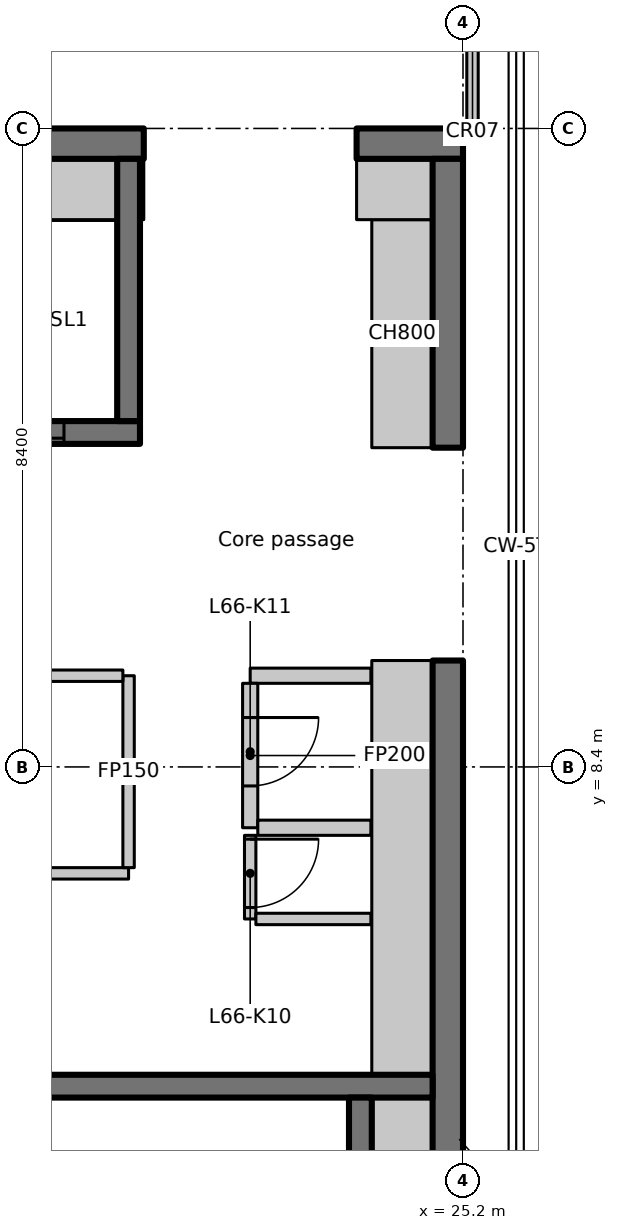
"""IFC4 building model, lengths in metres.
Left out: names, types, materials, properties, quantities, classifications, styles, units other than length and angle.
Written with IfcOpenShell. Run it as: python <this file> out.ifc"""

import sys

from ifc_helpers import new_model, si_unit, direction, frame, frame_2d, origin, place, context, subcontext, project, spatial, rectangle, extrude, element, fill, save


model = new_model("IFC4")
c1 = context("Model", 3, precision=1e-05, world=origin(), true_north=direction((0.0, 1.0)))
c2 = subcontext(c1, "Body", "Model", "MODEL_VIEW")
j1 = project(units=[si_unit("LENGTHUNIT", "METRE"), si_unit("PLANEANGLEUNIT", "RADIAN")], contexts=[c1])
p1 = place(None, origin())
s1 = spatial("IfcSite", under=j1, at=p1, CompositionType="ELEMENT")
p2 = place(p1, origin())
s2 = spatial("IfcBuilding", under=s1, at=p2, CompositionType="ELEMENT")
p3 = place(p2, frame((0.0, 0.0, 264.2)))
s3 = spatial("IfcBuildingStorey", under=s2, at=p3, CompositionType="ELEMENT", Elevation=264.2)
p4 = place(p3, frame((0.198, 16.6, 0.0), z_axis=(0.0, 0.0, 1.0), x_axis=(1.0, 0.0, 0.0)))
e1 = element("IfcWall", 1, at=p4, inside=s3, PredefinedType="SHEAR", context=c2, shape_type="SweptSolid", body=[
    extrude(rectangle(XDim=20.802, YDim=0.4, at=frame_2d((10.401, 0.0))), origin(), (0.0, 0.0, 1.0), 4.7),
])
p5 = place(p4, frame((1.852, 0.0, 0.0)))
e2 = element("IfcOpeningElement", 2, at=p5, cuts=e1, PredefinedType="OPENING", context=c2, shape_type="SweptSolid", body=[
    extrude(rectangle(XDim=1.1, YDim=2.3, at=frame_2d((0.55, 1.15))), frame((0.0, 0.21, 0.0), z_axis=(0.0, -1.0, 0.0), x_axis=(1.0, 0.0, 0.0)), (0.0, 0.0, 1.0), 0.42),
])
p6 = place(p3, frame((23.8, 16.6, 0.0), z_axis=(0.0, 0.0, 1.0), x_axis=(1.0, 0.0, 0.0)))
e3 = element("IfcWall", 3, at=p6, inside=s3, PredefinedType="SHEAR", context=c2, shape_type="SweptSolid", body=[
    extrude(rectangle(XDim=1.4, YDim=0.4, at=frame_2d((0.7, 0.0))), origin(), (0.0, 0.0, 1.0), 4.7),
])
p7 = place(p3, frame((25.0, 0.4, 0.0), z_axis=(0.0, 0.0, 1.0), x_axis=(0.0, 1.0, 0.0)))
e4 = element("IfcWall", 4, at=p7, inside=s3, PredefinedType="SHEAR", context=c2, shape_type="SweptSolid", body=[
    extrude(rectangle(XDim=9.4, YDim=0.4, at=frame_2d((4.7, 0.0))), origin(), (0.0, 0.0, 1.0), 4.7),
])
p8 = place(p3, frame((25.0, 12.6, 0.0), z_axis=(0.0, 0.0, 1.0), x_axis=(0.0, 1.0, 0.0)))
e5 = element("IfcWall", 5, at=p8, inside=s3, PredefinedType="SHEAR", context=c2, shape_type="SweptSolid", body=[
    extrude(rectangle(XDim=3.8, YDim=0.4, at=frame_2d((1.9, 0.0))), origin(), (0.0, 0.0, 1.0), 4.7),
])
p9 = place(p3, frame((24.4, 12.6, 0.0), z_axis=(0.0, 0.0, 1.0), x_axis=(0.0, 1.0, 0.0)))
e6 = element("IfcWall", 6, at=p9, inside=s3, PredefinedType="PARTITIONING", context=c2, shape_type="SweptSolid", body=[
    extrude(rectangle(XDim=3.0, YDim=0.8, at=frame_2d((1.5, 0.0))), origin(), (0.0, 0.0, 1.0), 4.7),
])
p10 = place(p3, frame((23.8, 16.0, 0.0), z_axis=(0.0, 0.0, 1.0), x_axis=(1.0, 0.0, 0.0)))
e7 = element("IfcWall", 7, at=p10, inside=s3, PredefinedType="PARTITIONING", context=c2, shape_type="SweptSolid", body=[
    extrude(rectangle(XDim=1.0, YDim=0.8, at=frame_2d((0.5, 0.0))), origin(), (0.0, 0.0, 1.0), 4.7),
])
p11 = place(p3, frame((17.85, 12.8, 0.0), z_axis=(0.0, 0.0, 1.0), x_axis=(1.0, 0.0, 0.0)))
e8 = element("IfcWall", 8, at=p11, inside=s3, PredefinedType="SHEAR", context=c2, shape_type="SweptSolid", body=[
    extrude(rectangle(XDim=3.1, YDim=0.3, at=frame_2d((1.55, 0.0))), origin(), (0.0, 0.0, 1.0), 4.7),
])
p12 = place(p11, frame((1.0, 0.0, 0.0)))
e9 = element("IfcOpeningElement", 9, at=p12, cuts=e8, PredefinedType="OPENING", context=c2, shape_type="SweptSolid", body=[
    extrude(rectangle(XDim=1.1, YDim=2.3, at=frame_2d((0.55, 1.15))), frame((0.0, 0.16, 0.0), z_axis=(0.0, -1.0, 0.0), x_axis=(1.0, 0.0, 0.0)), (0.0, 0.0, 1.0), 0.32),
])
p13 = place(p3, frame((20.8, 12.95, 0.0), z_axis=(0.0, 0.0, 1.0), x_axis=(0.0, 1.0, 0.0)))
e10 = element("IfcWall", 10, at=p13, inside=s3, PredefinedType="SHEAR", context=c2, shape_type="SweptSolid", body=[
    extrude(rectangle(XDim=3.45, YDim=0.3, at=frame_2d((1.725, 0.0))), origin(), (0.0, 0.0, 1.0), 4.7),
])
p14 = place(p3, frame((15.8, 4.2, 0.0), z_axis=(0.0, 0.0, 1.0), x_axis=(1.0, 0.0, 0.0)))
e11 = element("IfcWall", 11, at=p14, inside=s3, PredefinedType="SHEAR", context=c2, shape_type="SweptSolid", body=[
    extrude(rectangle(XDim=9.0, YDim=0.3, at=frame_2d((4.5, 0.0))), origin(), (0.0, 0.0, 1.0), 4.7),
])
p15 = place(p14, frame((0.4, 0.0, 0.0)))
e12 = element("IfcOpeningElement", 12, at=p15, cuts=e11, PredefinedType="OPENING", context=c2, shape_type="SweptSolid", body=[
    extrude(rectangle(XDim=1.0, YDim=2.1, at=frame_2d((0.5, 1.05))), frame((0.0, 0.16, 0.0), z_axis=(0.0, -1.0, 0.0), x_axis=(1.0, 0.0, 0.0)), (0.0, 0.0, 1.0), 0.32),
])
p16 = place(p3, frame((23.85, 1.5, 0.0), z_axis=(0.0, 0.0, 1.0), x_axis=(0.0, 1.0, 0.0)))
e13 = element("IfcWall", 13, at=p16, inside=s3, PredefinedType="SHEAR", context=c2, shape_type="SweptSolid", body=[
    extrude(rectangle(XDim=2.55, YDim=0.3, at=frame_2d((1.275, 0.0))), origin(), (0.0, 0.0, 1.0), 4.7),
])
p17 = place(p3, frame((23.988, 9.6, 0.0), z_axis=(0.0, 0.0, 1.0), x_axis=(-1.0, 0.0, 0.0)))
e14 = element("IfcWall", 14, at=p17, inside=s3, PredefinedType="PARTITIONING", context=c2, shape_type="SweptSolid", body=[
    extrude(rectangle(XDim=1.588, YDim=0.2, at=frame_2d((0.794, 0.0))), origin(), (0.0, 0.0, 1.0), 4.7),
])
p18 = place(p3, frame((22.4, 9.5, 0.0), z_axis=(0.0, 0.0, 1.0), x_axis=(0.0, -1.0, 0.0)))
e15 = element("IfcWall", 15, at=p18, inside=s3, PredefinedType="PARTITIONING", context=c2, shape_type="SweptSolid", body=[
    extrude(rectangle(XDim=1.9, YDim=0.2, at=frame_2d((0.95, 0.0))), origin(), (0.0, 0.0, 1.0), 4.7),
])
p19 = place(p18, frame((0.45, 0.0, 0.0)))
e16 = element("IfcOpeningElement", 16, at=p19, cuts=e15, PredefinedType="OPENING", context=c2, shape_type="SweptSolid", body=[
    extrude(rectangle(XDim=0.9, YDim=2.1, at=frame_2d((0.45, 1.05))), frame((0.0, 0.11, 0.0), z_axis=(0.0, -1.0, 0.0), x_axis=(1.0, 0.0, 0.0)), (0.0, 0.0, 1.0), 0.22),
])
p20 = place(p3, frame((22.5, 7.6, 0.0), z_axis=(0.0, 0.0, 1.0), x_axis=(1.0, 0.0, 0.0)))
e17 = element("IfcWall", 17, at=p20, inside=s3, PredefinedType="PARTITIONING", context=c2, shape_type="SweptSolid", body=[
    extrude(rectangle(XDim=1.488, YDim=0.2, at=frame_2d((0.744, 0.0))), origin(), (0.0, 0.0, 1.0), 4.7),
])
p21 = place(p3, frame((12.5, 7.0, 0.0), z_axis=(0.0, 0.0, 1.0), x_axis=(1.0, 0.0, 0.0)))
e18 = element("IfcWall", 18, at=p21, inside=s3, PredefinedType="PARTITIONING", context=c2, shape_type="SweptSolid", body=[
    extrude(rectangle(XDim=8.3, YDim=0.15, at=frame_2d((4.15, 0.0))), origin(), (0.0, 0.0, 1.0), 4.7),
])
p22 = place(p3, frame((20.8, 7.075, 0.0), z_axis=(0.0, 0.0, 1.0), x_axis=(0.0, 1.0, 0.0)))
e19 = element("IfcWall", 19, at=p22, inside=s3, PredefinedType="PARTITIONING", context=c2, shape_type="SweptSolid", body=[
    extrude(rectangle(XDim=2.525, YDim=0.15, at=frame_2d((1.263, 0.0))), origin(), (0.0, 0.0, 1.0), 4.7),
])
p23 = place(p3, frame((20.725, 9.6, 0.0), z_axis=(0.0, 0.0, 1.0), x_axis=(-1.0, 0.0, 0.0)))
e20 = element("IfcWall", 20, at=p23, inside=s3, PredefinedType="PARTITIONING", context=c2, shape_type="SweptSolid", body=[
    extrude(rectangle(XDim=8.225, YDim=0.15, at=frame_2d((4.113, 0.0))), origin(), (0.0, 0.0, 1.0), 4.7),
])
p24 = place(p23, frame((3.675, 0.0, 0.0)))
e21 = element("IfcOpeningElement", 21, at=p24, cuts=e20, PredefinedType="OPENING", context=c2, shape_type="SweptSolid", body=[
    extrude(rectangle(XDim=0.9, YDim=2.1, at=frame_2d((0.45, 1.05))), frame((0.0, 0.085, 0.0), z_axis=(0.0, -1.0, 0.0), x_axis=(1.0, 0.0, 0.0)), (0.0, 0.0, 1.0), 0.17),
])
p25 = place(p3, frame((22.4, 7.5, 0.0), z_axis=(0.0, 0.0, 1.0), x_axis=(0.0, -1.0, 0.0)))
e22 = element("IfcWall", 22, at=p25, inside=s3, PredefinedType="PARTITIONING", context=c2, shape_type="SweptSolid", body=[
    extrude(rectangle(XDim=1.1, YDim=0.15, at=frame_2d((0.55, 0.0))), origin(), (0.0, 0.0, 1.0), 4.7),
])
p26 = place(p25, frame((0.05, 0.0, 0.0)))
e23 = element("IfcOpeningElement", 23, at=p26, cuts=e22, PredefinedType="OPENING", context=c2, shape_type="SweptSolid", body=[
    extrude(rectangle(XDim=0.9, YDim=2.1, at=frame_2d((0.45, 1.05))), frame((0.0, 0.085, 0.0), z_axis=(0.0, -1.0, 0.0), x_axis=(1.0, 0.0, 0.0)), (0.0, 0.0, 1.0), 0.17),
])
p27 = place(p3, frame((22.475, 6.4, 0.0), z_axis=(0.0, 0.0, 1.0), x_axis=(1.0, 0.0, 0.0)))
e24 = element("IfcWall", 24, at=p27, inside=s3, PredefinedType="PARTITIONING", context=c2, shape_type="SweptSolid", body=[
    extrude(rectangle(XDim=1.513, YDim=0.15, at=frame_2d((0.756, 0.0))), origin(), (0.0, 0.0, 1.0), 4.7),
])
p28 = place(p3, frame((18.15, 16.0, 0.0), z_axis=(0.0, 0.0, 1.0), x_axis=(1.0, 0.0, 0.0)))
e25 = element("IfcWall", 25, at=p28, inside=s3, PredefinedType="PARTITIONING", context=c2, shape_type="SweptSolid", body=[
    extrude(rectangle(XDim=2.5, YDim=0.8, at=frame_2d((1.25, 0.0))), origin(), (0.0, 0.0, 1.0), 4.7),
])
p29 = place(p3, frame((20.95, 16.0, 0.0), z_axis=(0.0, 0.0, 1.0), x_axis=(1.0, 0.0, 0.0)))
e26 = element("IfcWall", 26, at=p29, inside=s3, PredefinedType="PARTITIONING", context=c2, shape_type="SweptSolid", body=[
    extrude(rectangle(XDim=0.05, YDim=0.8, at=frame_2d((0.025, 0.0))), origin(), (0.0, 0.0, 1.0), 4.7),
])
p30 = place(p3, frame((24.4, 1.5, 0.0), z_axis=(0.0, 0.0, 1.0), x_axis=(0.0, 1.0, 0.0)))
e27 = element("IfcWall", 27, at=p30, inside=s3, PredefinedType="PARTITIONING", context=c2, shape_type="SweptSolid", body=[
    extrude(rectangle(XDim=2.55, YDim=0.8, at=frame_2d((1.275, 0.0))), origin(), (0.0, 0.0, 1.0), 4.7),
])
p31 = place(p3, frame((24.4, 4.35, 0.0), z_axis=(0.0, 0.0, 1.0), x_axis=(0.0, 1.0, 0.0)))
e28 = element("IfcWall", 28, at=p31, inside=s3, PredefinedType="PARTITIONING", context=c2, shape_type="SweptSolid", body=[
    extrude(rectangle(XDim=5.45, YDim=0.8, at=frame_2d((2.725, 0.0))), origin(), (0.0, 0.0, 1.0), 4.7),
])
p32 = place(p3, frame((25.325, 16.6, 0.0), z_axis=(0.0, 0.0, 1.0), x_axis=(0.0, 1.0, 0.0)))
e29 = element("IfcWall", 29, at=p32, inside=s3, PredefinedType="PARTITIONING", context=c2, shape_type="SweptSolid", body=[
    extrude(rectangle(XDim=4.1, YDim=0.15, at=frame_2d((2.05, 0.0))), origin(), (0.0, 0.0, 1.0), 4.7),
])
p33 = place(p32, frame((1.55, 0.0, 0.0)))
e30 = element("IfcOpeningElement", 30, at=p33, cuts=e29, PredefinedType="OPENING", context=c2, shape_type="SweptSolid", body=[
    extrude(rectangle(XDim=1.0, YDim=2.1, at=frame_2d((0.5, 1.05))), frame((0.0, 0.085, 0.0), z_axis=(0.0, -1.0, 0.0), x_axis=(1.0, 0.0, 0.0)), (0.0, 0.0, 1.0), 0.17),
])
p34 = place(p12, origin())
e31 = element("IfcDoor", 31, at=p34, inside=s3, OperationType="SLIDING_TO_LEFT", PredefinedType="DOOR", context=c2, shape_type="SweptSolid", body=[
    extrude(rectangle(XDim=1.1, YDim=2.3, at=frame_2d((0.55, 1.15))), frame((0.0, 0.025, 0.0), z_axis=(0.0, -1.0, 0.0), x_axis=(1.0, 0.0, 0.0)), (0.0, 0.0, 1.0), 0.05),
])
fill(e9, e31)
p35 = place(p26, origin())
e32 = element("IfcDoor", 32, at=p35, inside=s3, OperationType="SINGLE_SWING_RIGHT", PredefinedType="DOOR", context=c2, shape_type="SweptSolid", body=[
    extrude(rectangle(XDim=0.9, YDim=2.1, at=frame_2d((0.45, 1.05))), frame((0.0, 0.025, 0.0), z_axis=(0.0, -1.0, 0.0), x_axis=(1.0, 0.0, 0.0)), (0.0, 0.0, 1.0), 0.05),
])
fill(e23, e32)
p36 = place(p19, origin())
e33 = element("IfcDoor", 33, at=p36, inside=s3, OperationType="SINGLE_SWING_LEFT", PredefinedType="DOOR", context=c2, shape_type="SweptSolid", body=[
    extrude(rectangle(XDim=0.9, YDim=2.1, at=frame_2d((0.45, 1.05))), frame((0.0, 0.025, 0.0), z_axis=(0.0, -1.0, 0.0), x_axis=(1.0, 0.0, 0.0)), (0.0, 0.0, 1.0), 0.05),
])
fill(e16, e33)
save(model, sys.argv[1])
